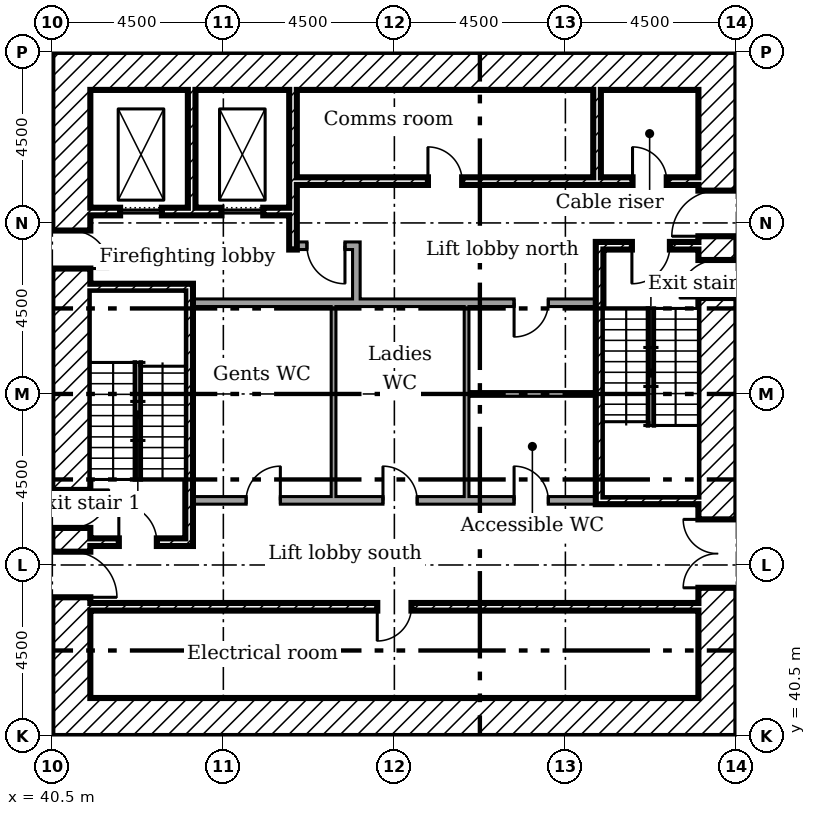
"""IFC4 building model, lengths in metres.
Left out: names, types, materials, properties, quantities, classifications, styles, units other than length and angle.
Written with IfcOpenShell. Run it as: python <this file> out.ifc"""

import sys

from ifc_helpers import new_model, si_unit, direction, frame, frame_2d, origin, place, context, subcontext, project, spatial, rectangle, extrude, element, fill, save


model = new_model("IFC4")
c1 = context("Model", 3, precision=1e-05, world=origin(), true_north=direction((0.0, 1.0)))
c2 = subcontext(c1, "Body", "Model", "MODEL_VIEW")
j1 = project(units=[si_unit("LENGTHUNIT", "METRE"), si_unit("PLANEANGLEUNIT", "RADIAN")], contexts=[c1])
p1 = place(None, origin())
s1 = spatial("IfcSite", under=j1, at=p1, CompositionType="ELEMENT")
p2 = place(p1, origin())
s2 = spatial("IfcBuilding", under=s1, at=p2, CompositionType="ELEMENT")
p3 = place(p2, frame((0.0, 0.0, -8.0)))
s3 = spatial("IfcBuildingStorey", under=s2, at=p3, CompositionType="ELEMENT", Elevation=-8.0)
p4 = place(p3, frame((58.0, 40.5, 0.0), z_axis=(0.0, 0.0, 1.0), x_axis=(0.0, 1.0, 0.0)))
e1 = element("IfcWall", 1, at=p4, inside=s3, PredefinedType="SHEAR", context=c2, shape_type="SweptSolid", body=[
    extrude(rectangle(XDim=18.0, YDim=1.0, at=frame_2d((9.0, 0.0))), origin(), (0.0, 0.0, 1.0), 3.5),
])
p5 = place(p4, frame((13.15, 0.0, 0.0)))
e2 = element("IfcOpeningElement", 2, at=p5, cuts=e1, PredefinedType="OPENING", context=c2, shape_type="SweptSolid", body=[
    extrude(rectangle(XDim=1.2, YDim=2.1, at=frame_2d((0.6, 1.05))), frame((0.0, 0.51, 0.0), z_axis=(0.0, -1.0, 0.0), x_axis=(1.0, 0.0, 0.0)), (0.0, 0.0, 1.0), 1.02),
])
p6 = place(p4, frame((3.9, 0.0, 0.0)))
e3 = element("IfcOpeningElement", 3, at=p6, cuts=e1, PredefinedType="OPENING", context=c2, shape_type="SweptSolid", body=[
    extrude(rectangle(XDim=1.8, YDim=2.1, at=frame_2d((0.9, 1.05))), frame((0.0, 0.51, 0.0), z_axis=(0.0, -1.0, 0.0), x_axis=(1.0, 0.0, 0.0)), (0.0, 0.0, 1.0), 1.02),
])
p7 = place(p4, frame((11.525, 0.0, 0.0)))
e4 = element("IfcOpeningElement", 4, at=p7, cuts=e1, PredefinedType="OPENING", context=c2, shape_type="SweptSolid", body=[
    extrude(rectangle(XDim=1.0, YDim=2.1, at=frame_2d((0.5, 1.05))), frame((0.0, 0.51, 0.0), z_axis=(0.0, -1.0, 0.0), x_axis=(1.0, 0.0, 0.0)), (0.0, 0.0, 1.0), 1.02),
])
for number, where in (
    (5, (41.5, 58.0, 0.0)),
    (6, (41.5, 41.0, 0.0)),
):
    element("IfcWall", number, at=place(p3, frame(where)), inside=s3, PredefinedType="SHEAR", context=c2, shape_type="SweptSolid", body=[
        extrude(rectangle(XDim=16.0, YDim=1.0, at=frame_2d((8.0, 0.0))), origin(), (0.0, 0.0, 1.0), 3.5),
    ])
p8 = place(p3, frame((41.0, 40.5, 0.0), z_axis=(0.0, 0.0, 1.0), x_axis=(0.0, 1.0, 0.0)))
e7 = element("IfcWall", 7, at=p8, inside=s3, PredefinedType="SHEAR", context=c2, shape_type="SweptSolid", body=[
    extrude(rectangle(XDim=18.0, YDim=1.0, at=frame_2d((9.0, 0.0))), origin(), (0.0, 0.0, 1.0), 3.5),
])
p9 = place(p8, frame((3.65, 0.0, 0.0)))
e8 = element("IfcOpeningElement", 8, at=p9, cuts=e7, PredefinedType="OPENING", context=c2, shape_type="SweptSolid", body=[
    extrude(rectangle(XDim=1.2, YDim=2.1, at=frame_2d((0.6, 1.05))), frame((0.0, 0.51, 0.0), z_axis=(0.0, -1.0, 0.0), x_axis=(1.0, 0.0, 0.0)), (0.0, 0.0, 1.0), 1.02),
])
p10 = place(p8, frame((5.475, 0.0, 0.0)))
e9 = element("IfcOpeningElement", 9, at=p10, cuts=e7, PredefinedType="OPENING", context=c2, shape_type="SweptSolid", body=[
    extrude(rectangle(XDim=1.0, YDim=2.1, at=frame_2d((0.5, 1.05))), frame((0.0, 0.51, 0.0), z_axis=(0.0, -1.0, 0.0), x_axis=(1.0, 0.0, 0.0)), (0.0, 0.0, 1.0), 1.02),
])
p11 = place(p8, frame((12.3, 0.0, 0.0)))
e10 = element("IfcOpeningElement", 10, at=p11, cuts=e7, PredefinedType="OPENING", context=c2, shape_type="SweptSolid", body=[
    extrude(rectangle(XDim=1.0, YDim=2.1, at=frame_2d((0.5, 1.05))), frame((0.0, 0.51, 0.0), z_axis=(0.0, -1.0, 0.0), x_axis=(1.0, 0.0, 0.0)), (0.0, 0.0, 1.0), 1.02),
])
p12 = place(p3, frame((44.167, 57.5, 0.0), z_axis=(0.0, 0.0, 1.0), x_axis=(0.0, -1.0, 0.0)))
e11 = element("IfcWall", 11, at=p12, inside=s3, PredefinedType="SHEAR", context=c2, shape_type="SweptSolid", body=[
    extrude(rectangle(XDim=3.1, YDim=0.2, at=frame_2d((1.55, 0.0))), origin(), (0.0, 0.0, 1.0), 3.5),
])
p13 = place(p3, frame((46.833, 57.5, 0.0), z_axis=(0.0, 0.0, 1.0), x_axis=(0.0, -1.0, 0.0)))
e12 = element("IfcWall", 12, at=p13, inside=s3, PredefinedType="SHEAR", context=c2, shape_type="SweptSolid", body=[
    extrude(rectangle(XDim=4.2, YDim=0.2, at=frame_2d((2.1, 0.0))), origin(), (0.0, 0.0, 1.0), 3.5),
])
p14 = place(p3, frame((54.833, 57.5, 0.0), z_axis=(0.0, 0.0, 1.0), x_axis=(0.0, -1.0, 0.0)))
e13 = element("IfcWall", 13, at=p14, inside=s3, PredefinedType="SHEAR", context=c2, shape_type="SweptSolid", body=[
    extrude(rectangle(XDim=2.3, YDim=0.2, at=frame_2d((1.15, 0.0))), origin(), (0.0, 0.0, 1.0), 3.5),
])
p15 = place(p3, frame((48.5, 51.9, 0.0), z_axis=(0.0, 0.0, 1.0), x_axis=(0.0, 1.0, 0.0)))
e14 = element("IfcWall", 14, at=p15, inside=s3, PredefinedType="PARTITIONING", context=c2, shape_type="SweptSolid", body=[
    extrude(rectangle(XDim=1.6, YDim=0.2, at=frame_2d((0.8, 0.0))), origin(), (0.0, 0.0, 1.0), 3.5),
])
p16 = place(p3, frame((46.933, 53.4, 0.0)))
e15 = element("IfcWall", 15, at=p16, inside=s3, PredefinedType="PARTITIONING", context=c2, shape_type="SweptSolid", body=[
    extrude(rectangle(XDim=1.467, YDim=0.2, at=frame_2d((0.733, 0.0))), origin(), (0.0, 0.0, 1.0), 3.5),
])
p17 = place(p16, frame((0.267, 0.0, 0.0)))
e16 = element("IfcOpeningElement", 16, at=p17, cuts=e15, PredefinedType="OPENING", context=c2, shape_type="SweptSolid", body=[
    extrude(rectangle(XDim=1.0, YDim=2.1, at=frame_2d((0.5, 1.05))), frame((0.0, 0.11, 0.0), z_axis=(0.0, -1.0, 0.0), x_axis=(1.0, 0.0, 0.0)), (0.0, 0.0, 1.0), 0.22),
])
p18 = place(p3, frame((46.933, 55.1, 0.0)))
e17 = element("IfcWall", 17, at=p18, inside=s3, PredefinedType="SHEAR", context=c2, shape_type="SweptSolid", body=[
    extrude(rectangle(XDim=10.567, YDim=0.2, at=frame_2d((5.283, 0.0))), origin(), (0.0, 0.0, 1.0), 3.5),
])
p19 = place(p18, frame((8.833, 0.0, 0.0)))
e18 = element("IfcOpeningElement", 18, at=p19, cuts=e17, PredefinedType="OPENING", context=c2, shape_type="SweptSolid", body=[
    extrude(rectangle(XDim=0.9, YDim=2.1, at=frame_2d((0.45, 1.05))), frame((0.0, 0.11, 0.0), z_axis=(0.0, -1.0, 0.0), x_axis=(1.0, 0.0, 0.0)), (0.0, 0.0, 1.0), 0.22),
])
p20 = place(p18, frame((3.45, 0.0, 0.0)))
e19 = element("IfcOpeningElement", 19, at=p20, cuts=e17, PredefinedType="OPENING", context=c2, shape_type="SweptSolid", body=[
    extrude(rectangle(XDim=0.9, YDim=2.1, at=frame_2d((0.45, 1.05))), frame((0.0, 0.11, 0.0), z_axis=(0.0, -1.0, 0.0), x_axis=(1.0, 0.0, 0.0)), (0.0, 0.0, 1.0), 0.22),
])
p21 = place(p3, frame((41.5, 54.3, 0.0)))
e20 = element("IfcWall", 20, at=p21, inside=s3, PredefinedType="SHEAR", context=c2, shape_type="SweptSolid", body=[
    extrude(rectangle(XDim=5.233, YDim=0.2, at=frame_2d((2.617, 0.0))), origin(), (0.0, 0.0, 1.0), 3.5),
])
p22 = place(p21, frame((0.783, 0.0, 0.0)))
e21 = element("IfcOpeningElement", 21, at=p22, cuts=e20, PredefinedType="OPENING", context=c2, shape_type="SweptSolid", body=[
    extrude(rectangle(XDim=1.1, YDim=2.1, at=frame_2d((0.55, 1.05))), frame((0.0, 0.11, 0.0), z_axis=(0.0, -1.0, 0.0), x_axis=(1.0, 0.0, 0.0)), (0.0, 0.0, 1.0), 0.22),
])
p23 = place(p21, frame((3.45, 0.0, 0.0)))
e22 = element("IfcOpeningElement", 22, at=p23, cuts=e20, PredefinedType="OPENING", context=c2, shape_type="SweptSolid", body=[
    extrude(rectangle(XDim=1.1, YDim=2.1, at=frame_2d((0.55, 1.05))), frame((0.0, 0.11, 0.0), z_axis=(0.0, -1.0, 0.0), x_axis=(1.0, 0.0, 0.0)), (0.0, 0.0, 1.0), 0.22),
])
p24 = place(p3, frame((41.5, 43.9, 0.0)))
e23 = element("IfcWall", 23, at=p24, inside=s3, PredefinedType="SHEAR", context=c2, shape_type="SweptSolid", body=[
    extrude(rectangle(XDim=16.0, YDim=0.2, at=frame_2d((8.0, 0.0))), origin(), (0.0, 0.0, 1.0), 3.5),
])
p25 = place(p24, frame((7.55, 0.0, 0.0)))
e24 = element("IfcOpeningElement", 24, at=p25, cuts=e23, PredefinedType="OPENING", context=c2, shape_type="SweptSolid", body=[
    extrude(rectangle(XDim=0.9, YDim=2.1, at=frame_2d((0.45, 1.05))), frame((0.0, 0.11, 0.0), z_axis=(0.0, -1.0, 0.0), x_axis=(1.0, 0.0, 0.0)), (0.0, 0.0, 1.0), 0.22),
])
p26 = place(p3, frame((44.1, 45.5, 0.0), z_axis=(0.0, 0.0, 1.0), x_axis=(0.0, 1.0, 0.0)))
e25 = element("IfcWall", 25, at=p26, inside=s3, PredefinedType="SHEAR", context=c2, shape_type="SweptSolid", body=[
    extrude(rectangle(XDim=6.9, YDim=0.2, at=frame_2d((3.45, 0.0))), origin(), (0.0, 0.0, 1.0), 3.5),
])
p27 = place(p3, frame((41.5, 52.3, 0.0)))
e26 = element("IfcWall", 26, at=p27, inside=s3, PredefinedType="SHEAR", context=c2, shape_type="SweptSolid", body=[
    extrude(rectangle(XDim=2.5, YDim=0.2, at=frame_2d((1.25, 0.0))), origin(), (0.0, 0.0, 1.0), 3.5),
])
p28 = place(p3, frame((41.5, 45.6, 0.0)))
e27 = element("IfcWall", 27, at=p28, inside=s3, PredefinedType="SHEAR", context=c2, shape_type="SweptSolid", body=[
    extrude(rectangle(XDim=2.5, YDim=0.2, at=frame_2d((1.25, 0.0))), origin(), (0.0, 0.0, 1.0), 3.5),
])
p29 = place(p28, frame((0.75, 0.0, 0.0)))
e28 = element("IfcOpeningElement", 28, at=p29, cuts=e27, PredefinedType="OPENING", context=c2, shape_type="SweptSolid", body=[
    extrude(rectangle(XDim=1.0, YDim=2.1, at=frame_2d((0.5, 1.05))), frame((0.0, 0.11, 0.0), z_axis=(0.0, -1.0, 0.0), x_axis=(1.0, 0.0, 0.0)), (0.0, 0.0, 1.0), 0.22),
])
p30 = place(p3, frame((54.8, 53.4, 0.0)))
e29 = element("IfcWall", 29, at=p30, inside=s3, PredefinedType="SHEAR", context=c2, shape_type="SweptSolid", body=[
    extrude(rectangle(XDim=2.7, YDim=0.2, at=frame_2d((1.35, 0.0))), origin(), (0.0, 0.0, 1.0), 3.5),
])
p31 = place(p30, frame((0.95, 0.0, 0.0)))
e30 = element("IfcOpeningElement", 30, at=p31, cuts=e29, PredefinedType="OPENING", context=c2, shape_type="SweptSolid", body=[
    extrude(rectangle(XDim=1.0, YDim=2.1, at=frame_2d((0.5, 1.05))), frame((0.0, 0.11, 0.0), z_axis=(0.0, -1.0, 0.0), x_axis=(1.0, 0.0, 0.0)), (0.0, 0.0, 1.0), 0.22),
])
p32 = place(p3, frame((54.8, 46.7, 0.0)))
e31 = element("IfcWall", 31, at=p32, inside=s3, PredefinedType="SHEAR", context=c2, shape_type="SweptSolid", body=[
    extrude(rectangle(XDim=2.7, YDim=0.2, at=frame_2d((1.35, 0.0))), origin(), (0.0, 0.0, 1.0), 3.5),
])
p33 = place(p3, frame((54.9, 46.8, 0.0), z_axis=(0.0, 0.0, 1.0), x_axis=(0.0, 1.0, 0.0)))
e32 = element("IfcWall", 32, at=p33, inside=s3, PredefinedType="SHEAR", context=c2, shape_type="SweptSolid", body=[
    extrude(rectangle(XDim=6.5, YDim=0.2, at=frame_2d((3.25, 0.0))), origin(), (0.0, 0.0, 1.0), 3.5),
])
p34 = place(p3, frame((44.2, 51.9, 0.0)))
e33 = element("IfcWall", 33, at=p34, inside=s3, PredefinedType="PARTITIONING", context=c2, shape_type="SweptSolid", body=[
    extrude(rectangle(XDim=10.6, YDim=0.2, at=frame_2d((5.3, 0.0))), origin(), (0.0, 0.0, 1.0), 3.5),
])
p35 = place(p34, frame((8.45, 0.0, 0.0)))
e34 = element("IfcOpeningElement", 34, at=p35, cuts=e33, PredefinedType="OPENING", context=c2, shape_type="SweptSolid", body=[
    extrude(rectangle(XDim=0.9, YDim=2.1, at=frame_2d((0.45, 1.05))), frame((0.0, 0.11, 0.0), z_axis=(0.0, -1.0, 0.0), x_axis=(1.0, 0.0, 0.0)), (0.0, 0.0, 1.0), 0.22),
])
p36 = place(p3, frame((44.2, 46.7, 0.0)))
e35 = element("IfcWall", 35, at=p36, inside=s3, PredefinedType="PARTITIONING", context=c2, shape_type="SweptSolid", body=[
    extrude(rectangle(XDim=10.6, YDim=0.2, at=frame_2d((5.3, 0.0))), origin(), (0.0, 0.0, 1.0), 3.5),
])
p37 = place(p36, frame((1.4, 0.0, 0.0)))
e36 = element("IfcOpeningElement", 36, at=p37, cuts=e35, PredefinedType="OPENING", context=c2, shape_type="SweptSolid", body=[
    extrude(rectangle(XDim=0.9, YDim=2.1, at=frame_2d((0.45, 1.05))), frame((0.0, 0.11, 0.0), z_axis=(0.0, -1.0, 0.0), x_axis=(1.0, 0.0, 0.0)), (0.0, 0.0, 1.0), 0.22),
])
p38 = place(p36, frame((5.0, 0.0, 0.0)))
e37 = element("IfcOpeningElement", 37, at=p38, cuts=e35, PredefinedType="OPENING", context=c2, shape_type="SweptSolid", body=[
    extrude(rectangle(XDim=0.9, YDim=2.1, at=frame_2d((0.45, 1.05))), frame((0.0, 0.11, 0.0), z_axis=(0.0, -1.0, 0.0), x_axis=(1.0, 0.0, 0.0)), (0.0, 0.0, 1.0), 0.22),
])
p39 = place(p36, frame((8.45, 0.0, 0.0)))
e38 = element("IfcOpeningElement", 38, at=p39, cuts=e35, PredefinedType="OPENING", context=c2, shape_type="SweptSolid", body=[
    extrude(rectangle(XDim=0.9, YDim=2.1, at=frame_2d((0.45, 1.05))), frame((0.0, 0.11, 0.0), z_axis=(0.0, -1.0, 0.0), x_axis=(1.0, 0.0, 0.0)), (0.0, 0.0, 1.0), 0.22),
])
p40 = place(p3, frame((47.9, 46.8, 0.0), z_axis=(0.0, 0.0, 1.0), x_axis=(0.0, 1.0, 0.0)))
e39 = element("IfcWall", 39, at=p40, inside=s3, PredefinedType="PARTITIONING", context=c2, shape_type="SweptSolid", body=[
    extrude(rectangle(XDim=5.0, YDim=0.125, at=frame_2d((2.5, 0.0))), origin(), (0.0, 0.0, 1.0), 3.5),
])
p41 = place(p3, frame((51.4, 46.8, 0.0), z_axis=(0.0, 0.0, 1.0), x_axis=(0.0, 1.0, 0.0)))
e40 = element("IfcWall", 40, at=p41, inside=s3, PredefinedType="PARTITIONING", context=c2, shape_type="SweptSolid", body=[
    extrude(rectangle(XDim=2.762, YDim=0.125, at=frame_2d((1.381, 0.0))), origin(), (0.0, 0.0, 1.0), 3.5),
])
p42 = place(p3, frame((54.8, 49.5, 0.0), z_axis=(0.0, 0.0, 1.0), x_axis=(-1.0, 0.0, 0.0)))
e41 = element("IfcWall", 41, at=p42, inside=s3, PredefinedType="PARTITIONING", context=c2, shape_type="SweptSolid", body=[
    extrude(rectangle(XDim=3.338, YDim=0.125, at=frame_2d((1.669, 0.0))), origin(), (0.0, 0.0, 1.0), 3.5),
])
p43 = place(p3, frame((51.4, 49.5, 0.0), z_axis=(0.0, 0.0, 1.0), x_axis=(0.0, 1.0, 0.0)))
e42 = element("IfcWall", 42, at=p43, inside=s3, PredefinedType="PARTITIONING", context=c2, shape_type="SweptSolid", body=[
    extrude(rectangle(XDim=2.3, YDim=0.125, at=frame_2d((1.15, 0.0))), origin(), (0.0, 0.0, 1.0), 3.5),
])
p44 = place(p5, origin())
e43 = element("IfcDoor", 43, at=p44, inside=s3, OperationType="SINGLE_SWING_RIGHT", PredefinedType="DOOR", context=c2, shape_type="SweptSolid", body=[
    extrude(rectangle(XDim=1.2, YDim=2.1, at=frame_2d((0.6, 1.05))), frame((0.0, 0.025, 0.0), z_axis=(0.0, -1.0, 0.0), x_axis=(1.0, 0.0, 0.0)), (0.0, 0.0, 1.0), 0.05),
])
fill(e2, e43)
p45 = place(p6, origin())
e44 = element("IfcDoor", 44, at=p45, inside=s3, OperationType="DOUBLE_DOOR_SINGLE_SWING", PredefinedType="DOOR", context=c2, shape_type="SweptSolid", body=[
    extrude(rectangle(XDim=1.8, YDim=2.1, at=frame_2d((0.9, 1.05))), frame((0.0, 0.025, 0.0), z_axis=(0.0, -1.0, 0.0), x_axis=(1.0, 0.0, 0.0)), (0.0, 0.0, 1.0), 0.05),
])
fill(e3, e44)
p46 = place(p9, frame((1.2, 0.0, 0.0), x_axis=(-1.0, 0.0, 0.0)))
e45 = element("IfcDoor", 45, at=p46, inside=s3, OperationType="SINGLE_SWING_LEFT", PredefinedType="DOOR", context=c2, shape_type="SweptSolid", body=[
    extrude(rectangle(XDim=1.2, YDim=2.1, at=frame_2d((0.6, 1.05))), frame((0.0, 0.025, 0.0), z_axis=(0.0, -1.0, 0.0), x_axis=(1.0, 0.0, 0.0)), (0.0, 0.0, 1.0), 0.05),
])
fill(e8, e45)
p47 = place(p29, origin())
e46 = element("IfcDoor", 46, at=p47, inside=s3, OperationType="SINGLE_SWING_RIGHT", PredefinedType="DOOR", context=c2, shape_type="SweptSolid", body=[
    extrude(rectangle(XDim=1.0, YDim=2.1, at=frame_2d((0.5, 1.05))), frame((0.0, 0.025, 0.0), z_axis=(0.0, -1.0, 0.0), x_axis=(1.0, 0.0, 0.0)), (0.0, 0.0, 1.0), 0.05),
])
fill(e28, e46)
p48 = place(p10, frame((1.0, 0.0, 0.0), x_axis=(-1.0, 0.0, 0.0)))
e47 = element("IfcDoor", 47, at=p48, inside=s3, OperationType="SINGLE_SWING_RIGHT", PredefinedType="DOOR", context=c2, shape_type="SweptSolid", body=[
    extrude(rectangle(XDim=1.0, YDim=2.1, at=frame_2d((0.5, 1.05))), frame((0.0, 0.025, 0.0), z_axis=(0.0, -1.0, 0.0), x_axis=(1.0, 0.0, 0.0)), (0.0, 0.0, 1.0), 0.05),
])
fill(e9, e47)
p49 = place(p31, frame((1.0, 0.0, 0.0), x_axis=(-1.0, 0.0, 0.0)))
e48 = element("IfcDoor", 48, at=p49, inside=s3, OperationType="SINGLE_SWING_LEFT", PredefinedType="DOOR", context=c2, shape_type="SweptSolid", body=[
    extrude(rectangle(XDim=1.0, YDim=2.1, at=frame_2d((0.5, 1.05))), frame((0.0, 0.025, 0.0), z_axis=(0.0, -1.0, 0.0), x_axis=(1.0, 0.0, 0.0)), (0.0, 0.0, 1.0), 0.05),
])
fill(e30, e48)
p50 = place(p7, origin())
e49 = element("IfcDoor", 49, at=p50, inside=s3, OperationType="SINGLE_SWING_RIGHT", PredefinedType="DOOR", context=c2, shape_type="SweptSolid", body=[
    extrude(rectangle(XDim=1.0, YDim=2.1, at=frame_2d((0.5, 1.05))), frame((0.0, 0.025, 0.0), z_axis=(0.0, -1.0, 0.0), x_axis=(1.0, 0.0, 0.0)), (0.0, 0.0, 1.0), 0.05),
])
fill(e4, e49)
p51 = place(p17, frame((1.0, 0.0, 0.0), x_axis=(-1.0, 0.0, 0.0)))
e50 = element("IfcDoor", 50, at=p51, inside=s3, OperationType="SINGLE_SWING_RIGHT", PredefinedType="DOOR", context=c2, shape_type="SweptSolid", body=[
    extrude(rectangle(XDim=1.0, YDim=2.1, at=frame_2d((0.5, 1.05))), frame((0.0, 0.025, 0.0), z_axis=(0.0, -1.0, 0.0), x_axis=(1.0, 0.0, 0.0)), (0.0, 0.0, 1.0), 0.05),
])
fill(e16, e50)
p52 = place(p11, frame((1.0, 0.0, 0.0), x_axis=(-1.0, 0.0, 0.0)))
e51 = element("IfcDoor", 51, at=p52, inside=s3, OperationType="SINGLE_SWING_LEFT", PredefinedType="DOOR", context=c2, shape_type="SweptSolid", body=[
    extrude(rectangle(XDim=1.0, YDim=2.1, at=frame_2d((0.5, 1.05))), frame((0.0, 0.025, 0.0), z_axis=(0.0, -1.0, 0.0), x_axis=(1.0, 0.0, 0.0)), (0.0, 0.0, 1.0), 0.05),
])
fill(e10, e51)
p53 = place(p19, origin())
e52 = element("IfcDoor", 52, at=p53, inside=s3, OperationType="SINGLE_SWING_RIGHT", PredefinedType="DOOR", context=c2, shape_type="SweptSolid", body=[
    extrude(rectangle(XDim=0.9, YDim=2.1, at=frame_2d((0.45, 1.05))), frame((0.0, 0.025, 0.0), z_axis=(0.0, -1.0, 0.0), x_axis=(1.0, 0.0, 0.0)), (0.0, 0.0, 1.0), 0.05),
])
fill(e18, e52)
p54 = place(p20, origin())
e53 = element("IfcDoor", 53, at=p54, inside=s3, OperationType="SINGLE_SWING_RIGHT", PredefinedType="DOOR", context=c2, shape_type="SweptSolid", body=[
    extrude(rectangle(XDim=0.9, YDim=2.1, at=frame_2d((0.45, 1.05))), frame((0.0, 0.025, 0.0), z_axis=(0.0, -1.0, 0.0), x_axis=(1.0, 0.0, 0.0)), (0.0, 0.0, 1.0), 0.05),
])
fill(e19, e53)
p55 = place(p25, frame((0.9, 0.0, 0.0), x_axis=(-1.0, 0.0, 0.0)))
e54 = element("IfcDoor", 54, at=p55, inside=s3, OperationType="SINGLE_SWING_LEFT", PredefinedType="DOOR", context=c2, shape_type="SweptSolid", body=[
    extrude(rectangle(XDim=0.9, YDim=2.1, at=frame_2d((0.45, 1.05))), frame((0.0, 0.025, 0.0), z_axis=(0.0, -1.0, 0.0), x_axis=(1.0, 0.0, 0.0)), (0.0, 0.0, 1.0), 0.05),
])
fill(e24, e54)
p56 = place(p37, origin())
e55 = element("IfcDoor", 55, at=p56, inside=s3, OperationType="SINGLE_SWING_LEFT", PredefinedType="DOOR", context=c2, shape_type="SweptSolid", body=[
    extrude(rectangle(XDim=0.9, YDim=2.1, at=frame_2d((0.45, 1.05))), frame((0.0, 0.025, 0.0), z_axis=(0.0, -1.0, 0.0), x_axis=(1.0, 0.0, 0.0)), (0.0, 0.0, 1.0), 0.05),
])
fill(e36, e55)
p57 = place(p38, origin())
e56 = element("IfcDoor", 56, at=p57, inside=s3, OperationType="SINGLE_SWING_RIGHT", PredefinedType="DOOR", context=c2, shape_type="SweptSolid", body=[
    extrude(rectangle(XDim=0.9, YDim=2.1, at=frame_2d((0.45, 1.05))), frame((0.0, 0.025, 0.0), z_axis=(0.0, -1.0, 0.0), x_axis=(1.0, 0.0, 0.0)), (0.0, 0.0, 1.0), 0.05),
])
fill(e37, e56)
p58 = place(p39, origin())
e57 = element("IfcDoor", 57, at=p58, inside=s3, OperationType="SINGLE_SWING_RIGHT", PredefinedType="DOOR", context=c2, shape_type="SweptSolid", body=[
    extrude(rectangle(XDim=0.9, YDim=2.1, at=frame_2d((0.45, 1.05))), frame((0.0, 0.025, 0.0), z_axis=(0.0, -1.0, 0.0), x_axis=(1.0, 0.0, 0.0)), (0.0, 0.0, 1.0), 0.05),
])
fill(e38, e57)
p59 = place(p35, frame((0.9, 0.0, 0.0), x_axis=(-1.0, 0.0, 0.0)))
e58 = element("IfcDoor", 58, at=p59, inside=s3, OperationType="SINGLE_SWING_LEFT", PredefinedType="DOOR", context=c2, shape_type="SweptSolid", body=[
    extrude(rectangle(XDim=0.9, YDim=2.1, at=frame_2d((0.45, 1.05))), frame((0.0, 0.025, 0.0), z_axis=(0.0, -1.0, 0.0), x_axis=(1.0, 0.0, 0.0)), (0.0, 0.0, 1.0), 0.05),
])
fill(e34, e58)
p60 = place(p22, origin())
e59 = element("IfcDoor", 59, at=p60, inside=s3, OperationType="SLIDING_TO_LEFT", PredefinedType="DOOR", context=c2, shape_type="SweptSolid", body=[
    extrude(rectangle(XDim=1.1, YDim=2.1, at=frame_2d((0.55, 1.05))), frame((0.0, 0.025, 0.0), z_axis=(0.0, -1.0, 0.0), x_axis=(1.0, 0.0, 0.0)), (0.0, 0.0, 1.0), 0.05),
])
fill(e21, e59)
p61 = place(p23, origin())
e60 = element("IfcDoor", 60, at=p61, inside=s3, OperationType="SLIDING_TO_LEFT", PredefinedType="DOOR", context=c2, shape_type="SweptSolid", body=[
    extrude(rectangle(XDim=1.1, YDim=2.1, at=frame_2d((0.55, 1.05))), frame((0.0, 0.025, 0.0), z_axis=(0.0, -1.0, 0.0), x_axis=(1.0, 0.0, 0.0)), (0.0, 0.0, 1.0), 0.05),
])
fill(e22, e60)
save(model, sys.argv[1])
